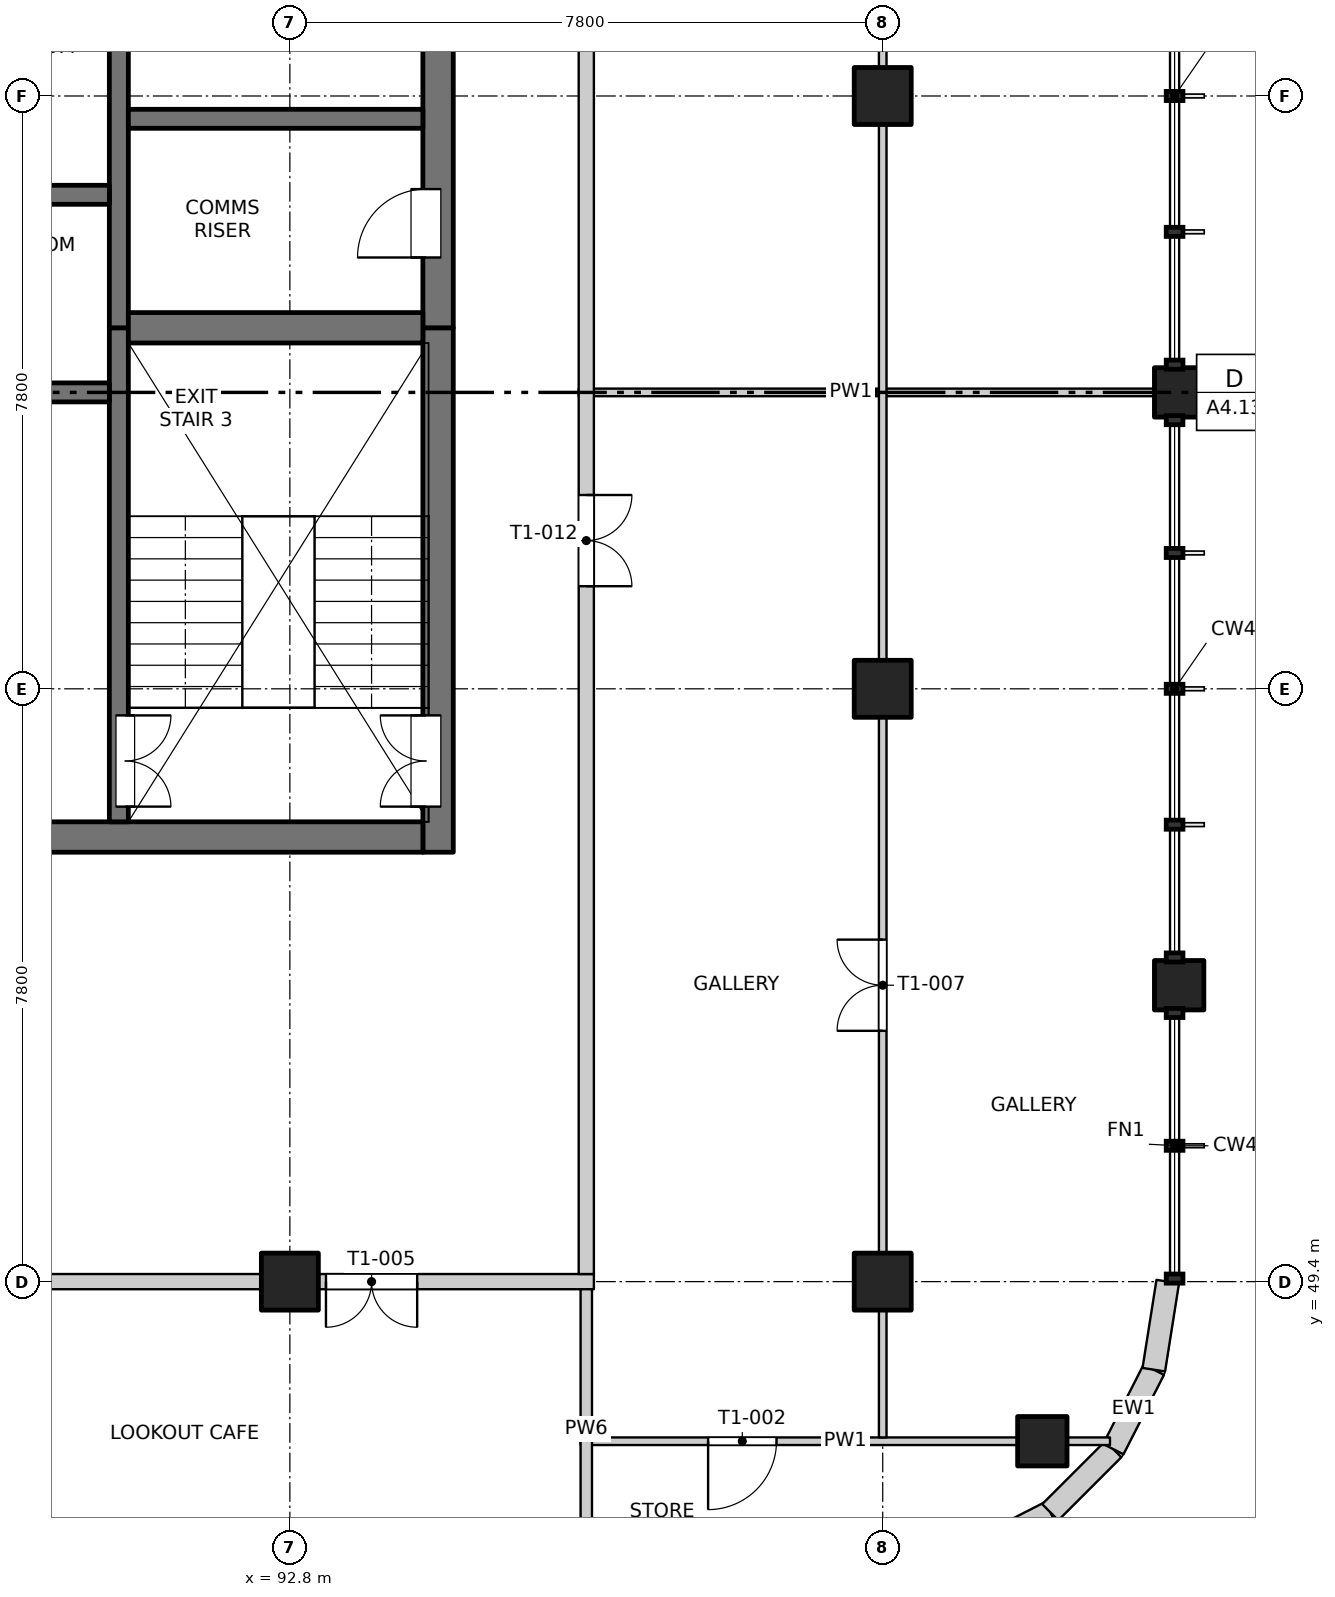
"""IFC4 building model, lengths in metres.
Left out: names, types, materials, properties, quantities, classifications, styles, units other than length and angle.
Written with IfcOpenShell. Run it as: python <this file> out.ifc"""

import sys

from ifc_helpers import new_model, si_unit, direction, frame, frame_2d, origin, origin_2d, place, context, subcontext, project, spatial, rectangle, extrude, element, fill, save


model = new_model("IFC4")
c1 = context("Model", 3, precision=1e-05, world=origin(), true_north=direction((0.0, 1.0)))
c2 = subcontext(c1, "Body", "Model", "MODEL_VIEW")
j1 = project(units=[si_unit("LENGTHUNIT", "METRE"), si_unit("PLANEANGLEUNIT", "RADIAN")], contexts=[c1])
p1 = place(None, origin())
s1 = spatial("IfcSite", under=j1, at=p1, CompositionType="ELEMENT")
p2 = place(p1, origin())
s2 = spatial("IfcBuilding", under=s1, at=p2, CompositionType="ELEMENT")
p3 = place(p2, frame((0.0, 0.0, 263.0)))
s3 = spatial("IfcBuildingStorey", under=s2, at=p3, CompositionType="ELEMENT", Elevation=263.0)
for number, where, z_axis, x_axis in (
    (1, (102.7, 47.3, -0.25), (0.0, 0.0, 1.0), (1.0, 0.0, 0.0)),
    (2, (104.5, 53.3, -0.25), (0.0, 0.0, 1.0), (1.0, 0.0, 0.0)),
    (3, (104.5, 61.1, -0.25), (0.0, 0.0, 1.0), (1.0, 0.0, 0.0)),
):
    element("IfcColumn", number, at=place(p3, frame(where, z_axis=z_axis, x_axis=x_axis)), inside=s3, PredefinedType="COLUMN", context=c2, shape_type="SweptSolid", body=[
        extrude(rectangle(XDim=0.65, YDim=0.65, at=origin_2d()), origin(), (0.0, 0.0, 1.0), 3.35),
    ])
for number, where, z_axis, x_axis in (
    (4, (92.8, 49.4, -0.25), (0.0, 0.0, 1.0), (1.0, 0.0, 0.0)),
    (5, (100.6, 49.4, -0.25), (0.0, 0.0, 1.0), (1.0, 0.0, 0.0)),
    (6, (100.6, 57.2, -0.25), (0.0, 0.0, 1.0), (1.0, 0.0, 0.0)),
    (7, (100.6, 65.0, -0.25), (0.0, 0.0, 1.0), (1.0, 0.0, 0.0)),
):
    element("IfcColumn", number, at=place(p3, frame(where, z_axis=z_axis, x_axis=x_axis)), inside=s3, PredefinedType="COLUMN", context=c2, shape_type="SweptSolid", body=[
        extrude(rectangle(XDim=0.75, YDim=0.75, at=origin_2d()), origin(), (0.0, 0.0, 1.0), 3.35),
    ])
p4 = place(p3, frame((94.75, 55.05, -0.25), z_axis=(0.0, 0.0, 1.0), x_axis=(0.0, 1.0, 0.0)))
e8 = element("IfcWall", 8, at=p4, inside=s3, PredefinedType="SOLIDWALL", context=c2, shape_type="SweptSolid", body=[
    extrude(rectangle(XDim=6.9, YDim=0.4, at=frame_2d((3.45, 0.0))), origin(), (0.0, 0.0, 1.0), 3.35),
])
p5 = place(p4, frame((0.6, 0.0, 0.25)))
e9 = element("IfcOpeningElement", 9, at=p5, cuts=e8, PredefinedType="OPENING", context=c2, shape_type="SweptSolid", body=[
    extrude(rectangle(XDim=1.2, YDim=2.1, at=frame_2d((0.6, 1.05))), frame((0.0, 0.21, 0.0), z_axis=(0.0, -1.0, 0.0), x_axis=(1.0, 0.0, 0.0)), (0.0, 0.0, 1.0), 0.42),
])
p6 = place(p3, frame((94.75, 61.95, -0.25), z_axis=(0.0, 0.0, 1.0), x_axis=(0.0, 1.0, 0.0)))
e10 = element("IfcWall", 10, at=p6, inside=s3, PredefinedType="SOLIDWALL", context=c2, shape_type="SweptSolid", body=[
    extrude(rectangle(XDim=15.35, YDim=0.4, at=frame_2d((7.675, 0.0))), origin(), (0.0, 0.0, 1.0), 3.35),
])
p7 = place(p6, frame((0.925, 0.0, 0.25)))
e11 = element("IfcOpeningElement", 11, at=p7, cuts=e10, PredefinedType="OPENING", context=c2, shape_type="SweptSolid", body=[
    extrude(rectangle(XDim=0.9, YDim=2.1, at=frame_2d((0.45, 1.05))), frame((0.0, 0.21, 0.0), z_axis=(0.0, -1.0, 0.0), x_axis=(1.0, 0.0, 0.0)), (0.0, 0.0, 1.0), 0.42),
])
p8 = place(p6, frame((5.15, 0.0, 0.25)))
e12 = element("IfcOpeningElement", 12, at=p8, cuts=e10, PredefinedType="OPENING", context=c2, shape_type="SweptSolid", body=[
    extrude(rectangle(XDim=0.9, YDim=2.1, at=frame_2d((0.45, 1.05))), frame((0.0, 0.21, 0.0), z_axis=(0.0, -1.0, 0.0), x_axis=(1.0, 0.0, 0.0)), (0.0, 0.0, 1.0), 0.42),
])
p9 = place(p6, frame((9.65, 0.0, 0.25)))
e13 = element("IfcOpeningElement", 13, at=p9, cuts=e10, PredefinedType="OPENING", context=c2, shape_type="SweptSolid", body=[
    extrude(rectangle(XDim=0.9, YDim=2.1, at=frame_2d((0.45, 1.05))), frame((0.0, 0.21, 0.0), z_axis=(0.0, -1.0, 0.0), x_axis=(1.0, 0.0, 0.0)), (0.0, 0.0, 1.0), 0.42),
])
p10 = place(p6, frame((13.1, 0.0, 0.25)))
e14 = element("IfcOpeningElement", 14, at=p10, cuts=e10, PredefinedType="OPENING", context=c2, shape_type="SweptSolid", body=[
    extrude(rectangle(XDim=0.9, YDim=2.1, at=frame_2d((0.45, 1.05))), frame((0.0, 0.21, 0.0), z_axis=(0.0, -1.0, 0.0), x_axis=(1.0, 0.0, 0.0)), (0.0, 0.0, 1.0), 0.42),
])
p11 = place(p3, frame((75.45, 55.25, -0.25), z_axis=(0.0, 0.0, 1.0), x_axis=(1.0, 0.0, 0.0)))
e15 = element("IfcWall", 15, at=p11, inside=s3, PredefinedType="SOLIDWALL", context=c2, shape_type="SweptSolid", body=[
    extrude(rectangle(XDim=19.1, YDim=0.4, at=frame_2d((9.55, 0.0))), origin(), (0.0, 0.0, 1.0), 3.35),
])
p12 = place(p11, frame((8.8, 0.0, 0.25)))
e16 = element("IfcOpeningElement", 16, at=p12, cuts=e15, PredefinedType="OPENING", context=c2, shape_type="SweptSolid", body=[
    extrude(rectangle(XDim=1.5, YDim=2.1, at=frame_2d((0.75, 1.05))), frame((0.0, 0.21, 0.0), z_axis=(0.0, -1.0, 0.0), x_axis=(1.0, 0.0, 0.0)), (0.0, 0.0, 1.0), 0.42),
])
p13 = place(p3, frame((90.55, 55.45, -0.25), z_axis=(0.0, 0.0, 1.0), x_axis=(0.0, 1.0, 0.0)))
e17 = element("IfcWall", 17, at=p13, inside=s3, PredefinedType="SOLIDWALL", context=c2, shape_type="SweptSolid", body=[
    extrude(rectangle(XDim=6.5, YDim=0.25, at=frame_2d((3.25, 0.0))), origin(), (0.0, 0.0, 1.0), 3.35),
])
p14 = place(p13, frame((0.2, 0.0, 0.25)))
e18 = element("IfcOpeningElement", 18, at=p14, cuts=e17, PredefinedType="OPENING", context=c2, shape_type="SweptSolid", body=[
    extrude(rectangle(XDim=1.2, YDim=2.1, at=frame_2d((0.6, 1.05))), frame((0.0, 0.135, 0.0), z_axis=(0.0, -1.0, 0.0), x_axis=(1.0, 0.0, 0.0)), (0.0, 0.0, 1.0), 0.27),
])
p15 = place(p3, frame((90.55, 61.95, -0.25), z_axis=(0.0, 0.0, 1.0), x_axis=(0.0, 1.0, 0.0)))
e19 = element("IfcWall", 19, at=p15, inside=s3, PredefinedType="SOLIDWALL", context=c2, shape_type="SweptSolid", body=[
    extrude(rectangle(XDim=15.35, YDim=0.25, at=frame_2d((7.675, 0.0))), origin(), (0.0, 0.0, 1.0), 3.35),
])
for number, where, z_axis, x_axis in (
    (20, (87.425, 61.1, -0.25), (0.0, 0.0, 1.0), (1.0, 0.0, 0.0)),
    (21, (87.425, 63.7, -0.25), (0.0, 0.0, 1.0), (1.0, 0.0, 0.0)),
):
    element("IfcWall", number, at=place(p3, frame(where, z_axis=z_axis, x_axis=x_axis)), inside=s3, PredefinedType="SOLIDWALL", context=c2, shape_type="SweptSolid", body=[
        extrude(rectangle(XDim=3.0, YDim=0.25, at=frame_2d((1.5, 0.0))), origin(), (0.0, 0.0, 1.0), 3.35),
    ])
p16 = place(p3, frame((90.675, 61.95, -0.25), z_axis=(0.0, 0.0, 1.0), x_axis=(1.0, 0.0, 0.0)))
e22 = element("IfcWall", 22, at=p16, inside=s3, PredefinedType="SOLIDWALL", context=c2, shape_type="SweptSolid", body=[
    extrude(rectangle(XDim=3.875, YDim=0.4, at=frame_2d((1.938, 0.0))), origin(), (0.0, 0.0, 1.0), 3.35),
])
p17 = place(p3, frame((90.675, 64.7, -0.25), z_axis=(0.0, 0.0, 1.0), x_axis=(1.0, 0.0, 0.0)))
e23 = element("IfcWall", 23, at=p17, inside=s3, PredefinedType="SOLIDWALL", context=c2, shape_type="SweptSolid", body=[
    extrude(rectangle(XDim=3.875, YDim=0.25, at=frame_2d((1.938, 0.0))), origin(), (0.0, 0.0, 1.0), 3.35),
])
p18 = place(p3, frame((101.759, 45.833, 0.0), z_axis=(0.0, 0.0, 1.0), x_axis=(0.890988677504, 0.454025524128, 0.0)))
e24 = element("IfcWall", 24, at=p18, inside=s3, PredefinedType="SOLIDWALL", context=c2, shape_type="SweptSolid", body=[
    extrude(rectangle(XDim=1.173, YDim=0.3, at=frame_2d((0.587, 0.0))), origin(), (0.0, 0.0, 1.0), 3.1),
])
p19 = place(p3, frame((102.804, 46.366, 0.0), z_axis=(0.0, 0.0, 1.0), x_axis=(0.707106781187, 0.707106781187, 0.0)))
e25 = element("IfcWall", 25, at=p19, inside=s3, PredefinedType="SOLIDWALL", context=c2, shape_type="SweptSolid", body=[
    extrude(rectangle(XDim=1.173, YDim=0.3, at=frame_2d((0.586, 0.0))), origin(), (0.0, 0.0, 1.0), 3.1),
])
p20 = place(p3, frame((103.634, 47.196, 0.0), z_axis=(0.0, 0.0, 1.0), x_axis=(0.454025524128, 0.890988677504, 0.0)))
e26 = element("IfcWall", 26, at=p20, inside=s3, PredefinedType="SOLIDWALL", context=c2, shape_type="SweptSolid", body=[
    extrude(rectangle(XDim=1.173, YDim=0.3, at=frame_2d((0.587, 0.0))), origin(), (0.0, 0.0, 1.0), 3.1),
])
p21 = place(p3, frame((104.167, 48.241, 0.0), z_axis=(0.0, 0.0, 1.0), x_axis=(0.156496880861, 0.987678452879, 0.0)))
e27 = element("IfcWall", 27, at=p21, inside=s3, PredefinedType="SOLIDWALL", context=c2, shape_type="SweptSolid", body=[
    extrude(rectangle(XDim=1.173, YDim=0.3, at=frame_2d((0.586, 0.0))), origin(), (0.0, 0.0, 1.0), 3.1),
])
p22 = place(p3, frame((96.625, 47.3, 0.0), z_axis=(0.0, 0.0, 1.0), x_axis=(1.0, 0.0, 0.0)))
e28 = element("IfcWall", 28, at=p22, inside=s3, PredefinedType="PARTITIONING", context=c2, shape_type="SweptSolid", body=[
    extrude(rectangle(XDim=6.965, YDim=0.1, at=frame_2d((3.482, 0.0))), origin(), (0.0, 0.0, 1.0), 3.1),
])
p23 = place(p22, frame((1.678, 0.0, 0.0)))
e29 = element("IfcOpeningElement", 29, at=p23, cuts=e28, PredefinedType="OPENING", context=c2, shape_type="SweptSolid", body=[
    extrude(rectangle(XDim=0.9, YDim=2.1, at=frame_2d((0.45, 1.05))), frame((0.0, 0.06, 0.0), z_axis=(0.0, -1.0, 0.0), x_axis=(1.0, 0.0, 0.0)), (0.0, 0.0, 1.0), 0.12),
])
p24 = place(p3, frame((73.2, 49.4, 0.0), z_axis=(0.0, 0.0, 1.0), x_axis=(1.0, 0.0, 0.0)))
e30 = element("IfcWall", 30, at=p24, inside=s3, PredefinedType="PARTITIONING", context=c2, shape_type="SweptSolid", body=[
    extrude(rectangle(XDim=23.6, YDim=0.2, at=frame_2d((11.8, 0.0))), origin(), (0.0, 0.0, 1.0), 3.1),
])
p25 = place(p24, frame((2.325, 0.0, 0.0)))
e31 = element("IfcOpeningElement", 31, at=p25, cuts=e30, PredefinedType="OPENING", context=c2, shape_type="SweptSolid", body=[
    extrude(rectangle(XDim=1.2, YDim=2.1, at=frame_2d((0.6, 1.05))), frame((0.0, 0.11, 0.0), z_axis=(0.0, -1.0, 0.0), x_axis=(1.0, 0.0, 0.0)), (0.0, 0.0, 1.0), 0.22),
])
p26 = place(p24, frame((12.3, 0.0, 0.0)))
e32 = element("IfcOpeningElement", 32, at=p26, cuts=e30, PredefinedType="OPENING", context=c2, shape_type="SweptSolid", body=[
    extrude(rectangle(XDim=1.2, YDim=2.1, at=frame_2d((0.6, 1.05))), frame((0.0, 0.11, 0.0), z_axis=(0.0, -1.0, 0.0), x_axis=(1.0, 0.0, 0.0)), (0.0, 0.0, 1.0), 0.22),
])
p27 = place(p24, frame((20.075, 0.0, 0.0)))
e33 = element("IfcOpeningElement", 33, at=p27, cuts=e30, PredefinedType="OPENING", context=c2, shape_type="SweptSolid", body=[
    extrude(rectangle(XDim=1.2, YDim=2.1, at=frame_2d((0.6, 1.05))), frame((0.0, 0.11, 0.0), z_axis=(0.0, -1.0, 0.0), x_axis=(1.0, 0.0, 0.0)), (0.0, 0.0, 1.0), 0.22),
])
p28 = place(p3, frame((96.6, 61.1, 0.0), z_axis=(0.0, 0.0, 1.0), x_axis=(1.0, 0.0, 0.0)))
e34 = element("IfcWall", 34, at=p28, inside=s3, PredefinedType="PARTITIONING", context=c2, shape_type="SweptSolid", body=[
    extrude(rectangle(XDim=7.765, YDim=0.1, at=frame_2d((3.882, 0.0))), origin(), (0.0, 0.0, 1.0), 3.1),
])
p29 = place(p3, frame((96.7, 45.635, 0.0), z_axis=(0.0, 0.0, 1.0), x_axis=(0.0, 1.0, 0.0)))
e35 = element("IfcWall", 35, at=p29, inside=s3, PredefinedType="PARTITIONING", context=c2, shape_type="SweptSolid", body=[
    extrude(rectangle(XDim=3.665, YDim=0.15, at=frame_2d((1.833, 0.0))), origin(), (0.0, 0.0, 1.0), 3.1),
])
p30 = place(p3, frame((96.7, 49.5, 0.0), z_axis=(0.0, 0.0, 1.0), x_axis=(0.0, 1.0, 0.0)))
e36 = element("IfcWall", 36, at=p30, inside=s3, PredefinedType="PARTITIONING", context=c2, shape_type="SweptSolid", body=[
    extrude(rectangle(XDim=34.865, YDim=0.2, at=frame_2d((17.433, 0.0))), origin(), (0.0, 0.0, 1.0), 3.1),
])
p31 = place(p30, frame((9.05, 0.0, 0.0)))
e37 = element("IfcOpeningElement", 37, at=p31, cuts=e36, PredefinedType="OPENING", context=c2, shape_type="SweptSolid", body=[
    extrude(rectangle(XDim=1.2, YDim=2.1, at=frame_2d((0.6, 1.05))), frame((0.0, 0.11, 0.0), z_axis=(0.0, -1.0, 0.0), x_axis=(1.0, 0.0, 0.0)), (0.0, 0.0, 1.0), 0.22),
])
p32 = place(p30, frame((20.75, 0.0, 0.0)))
e38 = element("IfcOpeningElement", 38, at=p32, cuts=e36, PredefinedType="OPENING", context=c2, shape_type="SweptSolid", body=[
    extrude(rectangle(XDim=1.2, YDim=2.1, at=frame_2d((0.6, 1.05))), frame((0.0, 0.11, 0.0), z_axis=(0.0, -1.0, 0.0), x_axis=(1.0, 0.0, 0.0)), (0.0, 0.0, 1.0), 0.22),
])
p33 = place(p30, frame((24.65, 0.0, 0.0)))
e39 = element("IfcOpeningElement", 39, at=p33, cuts=e36, PredefinedType="OPENING", context=c2, shape_type="SweptSolid", body=[
    extrude(rectangle(XDim=1.2, YDim=2.1, at=frame_2d((0.6, 1.05))), frame((0.0, 0.11, 0.0), z_axis=(0.0, -1.0, 0.0), x_axis=(1.0, 0.0, 0.0)), (0.0, 0.0, 1.0), 0.22),
])
p34 = place(p30, frame((31.825, 0.0, 0.0)))
e40 = element("IfcOpeningElement", 40, at=p34, cuts=e36, PredefinedType="OPENING", context=c2, shape_type="SweptSolid", body=[
    extrude(rectangle(XDim=1.2, YDim=2.1, at=frame_2d((0.6, 1.05))), frame((0.0, 0.11, 0.0), z_axis=(0.0, -1.0, 0.0), x_axis=(1.0, 0.0, 0.0)), (0.0, 0.0, 1.0), 0.22),
])
p35 = place(p30, frame((33.65, 0.0, 0.0)))
e41 = element("IfcOpeningElement", 41, at=p35, cuts=e36, PredefinedType="OPENING", context=c2, shape_type="SweptSolid", body=[
    extrude(rectangle(XDim=0.9, YDim=2.1, at=frame_2d((0.45, 1.05))), frame((0.0, 0.11, 0.0), z_axis=(0.0, -1.0, 0.0), x_axis=(1.0, 0.0, 0.0)), (0.0, 0.0, 1.0), 0.22),
])
p36 = place(p3, frame((100.6, 47.35, 0.0), z_axis=(0.0, 0.0, 1.0), x_axis=(0.0, 1.0, 0.0)))
e42 = element("IfcWall", 42, at=p36, inside=s3, PredefinedType="PARTITIONING", context=c2, shape_type="SweptSolid", body=[
    extrude(rectangle(XDim=25.4, YDim=0.1, at=frame_2d((12.7, 0.0))), origin(), (0.0, 0.0, 1.0), 3.1),
])
p37 = place(p36, frame((5.35, 0.0, 0.0)))
e43 = element("IfcOpeningElement", 43, at=p37, cuts=e42, PredefinedType="OPENING", context=c2, shape_type="SweptSolid", body=[
    extrude(rectangle(XDim=1.2, YDim=2.1, at=frame_2d((0.6, 1.05))), frame((0.0, 0.06, 0.0), z_axis=(0.0, -1.0, 0.0), x_axis=(1.0, 0.0, 0.0)), (0.0, 0.0, 1.0), 0.12),
])
p38 = place(p36, frame((21.017, 0.0, 0.0)))
e44 = element("IfcOpeningElement", 44, at=p38, cuts=e42, PredefinedType="OPENING", context=c2, shape_type="SweptSolid", body=[
    extrude(rectangle(XDim=1.2, YDim=2.1, at=frame_2d((0.6, 1.05))), frame((0.0, 0.06, 0.0), z_axis=(0.0, -1.0, 0.0), x_axis=(1.0, 0.0, 0.0)), (0.0, 0.0, 1.0), 0.12),
])
p39 = place(p23, origin())
e45 = element("IfcDoor", 45, at=p39, inside=s3, OperationType="SINGLE_SWING_RIGHT", PredefinedType="DOOR", context=c2, shape_type="SweptSolid", body=[
    extrude(rectangle(XDim=0.9, YDim=2.1, at=frame_2d((0.45, 1.05))), frame((0.0, 0.025, 0.0), z_axis=(0.0, -1.0, 0.0), x_axis=(1.0, 0.0, 0.0)), (0.0, 0.0, 1.0), 0.05),
])
fill(e29, e45)
p40 = place(p27, origin())
e46 = element("IfcDoor", 46, at=p40, inside=s3, OperationType="DOUBLE_DOOR_SINGLE_SWING", PredefinedType="DOOR", context=c2, shape_type="SweptSolid", body=[
    extrude(rectangle(XDim=1.2, YDim=2.1, at=frame_2d((0.6, 1.05))), frame((0.0, 0.025, 0.0), z_axis=(0.0, -1.0, 0.0), x_axis=(1.0, 0.0, 0.0)), (0.0, 0.0, 1.0), 0.05),
])
fill(e33, e46)
p41 = place(p37, origin())
e47 = element("IfcDoor", 47, at=p41, inside=s3, OperationType="DOUBLE_DOOR_SINGLE_SWING", PredefinedType="DOOR", context=c2, shape_type="SweptSolid", body=[
    extrude(rectangle(XDim=1.2, YDim=2.1, at=frame_2d((0.6, 1.05))), frame((0.0, 0.025, 0.0), z_axis=(0.0, -1.0, 0.0), x_axis=(1.0, 0.0, 0.0)), (0.0, 0.0, 1.0), 0.05),
])
fill(e43, e47)
p42 = place(p14, origin())
e48 = element("IfcDoor", 48, at=p42, inside=s3, OperationType="DOUBLE_DOOR_SINGLE_SWING", PredefinedType="DOOR", context=c2, shape_type="SweptSolid", body=[
    extrude(rectangle(XDim=1.2, YDim=2.1, at=frame_2d((0.6, 1.05))), frame((0.0, -0.06, 0.0), z_axis=(0.0, -1.0, 0.0), x_axis=(1.0, 0.0, 0.0)), (0.0, 0.0, 1.0), 0.05),
])
fill(e18, e48)
p43 = place(p5, origin())
e49 = element("IfcDoor", 49, at=p43, inside=s3, OperationType="DOUBLE_DOOR_SINGLE_SWING", PredefinedType="DOOR", context=c2, shape_type="SweptSolid", body=[
    extrude(rectangle(XDim=1.2, YDim=2.1, at=frame_2d((0.6, 1.05))), frame((0.0, 0.185, 0.0), z_axis=(0.0, -1.0, 0.0), x_axis=(1.0, 0.0, 0.0)), (0.0, 0.0, 1.0), 0.05),
])
fill(e9, e49)
p44 = place(p31, origin())
e50 = element("IfcDoor", 50, at=p44, inside=s3, OperationType="DOUBLE_DOOR_SINGLE_SWING", PredefinedType="DOOR", context=c2, shape_type="SweptSolid", body=[
    extrude(rectangle(XDim=1.2, YDim=2.1, at=frame_2d((0.6, 1.05))), frame((0.0, 0.025, 0.0), z_axis=(0.0, -1.0, 0.0), x_axis=(1.0, 0.0, 0.0)), (0.0, 0.0, 1.0), 0.05),
])
fill(e37, e50)
p45 = place(p7, origin())
e51 = element("IfcDoor", 51, at=p45, inside=s3, OperationType="SINGLE_SWING_LEFT", PredefinedType="DOOR", context=c2, shape_type="SweptSolid", body=[
    extrude(rectangle(XDim=0.9, YDim=2.1, at=frame_2d((0.45, 1.05))), frame((0.0, 0.185, 0.0), z_axis=(0.0, -1.0, 0.0), x_axis=(1.0, 0.0, 0.0)), (0.0, 0.0, 1.0), 0.05),
])
fill(e11, e51)
save(model, sys.argv[1])
